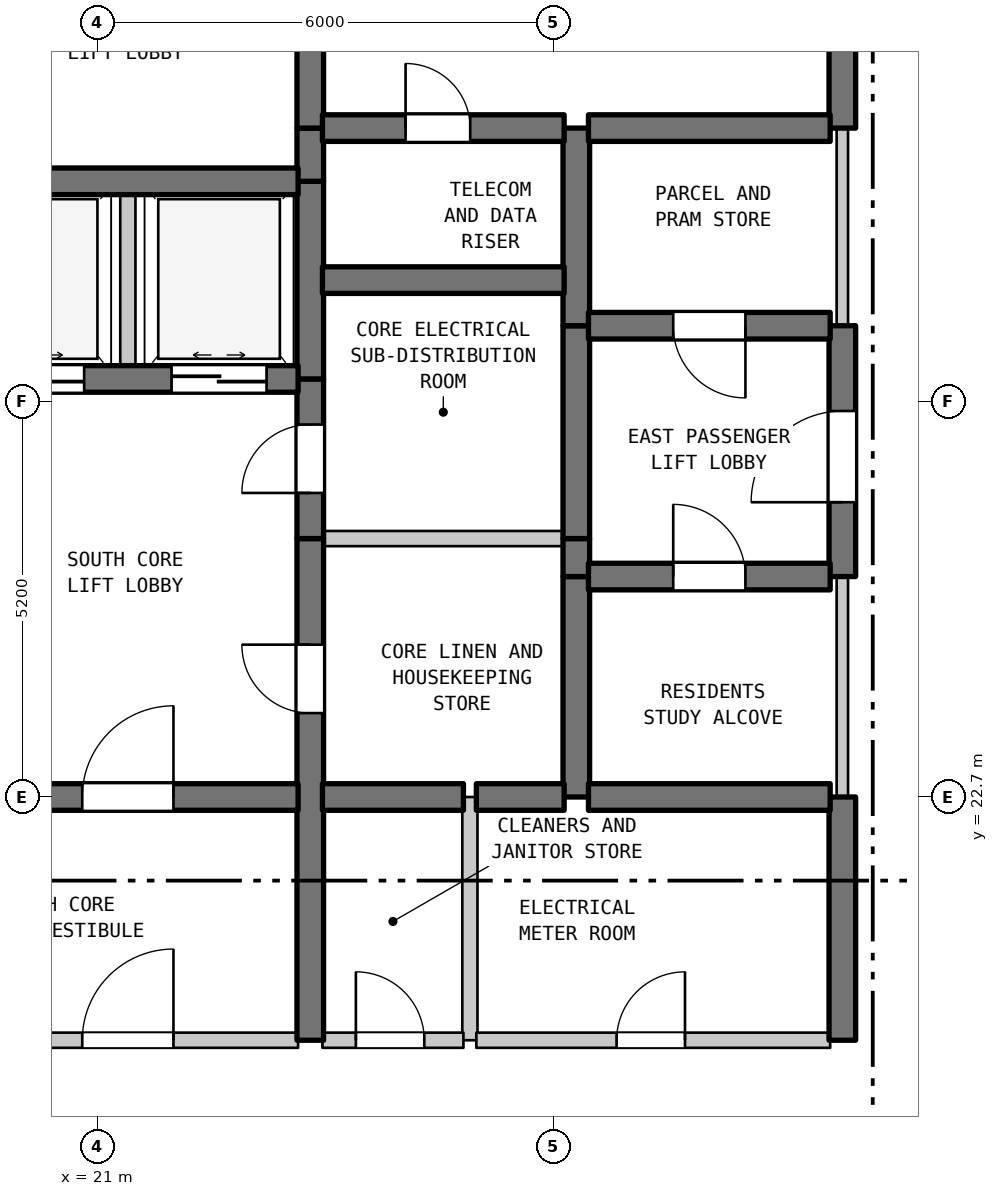
"""IFC4 building model, lengths in metres.
Left out: names, types, materials, properties, quantities, classifications, styles, units other than length and angle.
Written with IfcOpenShell. Run it as: python <this file> out.ifc"""

import sys

from ifc_helpers import new_model, si_unit, direction, frame, frame_2d, origin, place, context, subcontext, project, spatial, rectangle, extrude, element, fill, save


model = new_model("IFC4")
c1 = context("Model", 3, precision=1e-05, world=origin(), true_north=direction((0.0, 1.0)))
c2 = subcontext(c1, "Body", "Model", "MODEL_VIEW")
j1 = project(units=[si_unit("LENGTHUNIT", "METRE"), si_unit("PLANEANGLEUNIT", "RADIAN")], contexts=[c1])
p1 = place(None, origin())
s1 = spatial("IfcSite", under=j1, at=p1, CompositionType="ELEMENT")
p2 = place(p1, origin())
s2 = spatial("IfcBuilding", under=s1, at=p2, CompositionType="ELEMENT")
p3 = place(p2, frame((0.0, 0.0, 303.6)))
s3 = spatial("IfcBuildingStorey", under=s2, at=p3, CompositionType="ELEMENT", Elevation=303.6)
p4 = place(p3, frame((21.4, 28.2, 0.0), z_axis=(0.0, 0.0, 1.0), x_axis=(0.0, 1.0, 0.0)))
e1 = element("IfcWall", 1, at=p4, inside=s3, PredefinedType="STANDARD", context=c2, shape_type="SweptSolid", body=[
    extrude(rectangle(XDim=2.6, YDim=0.2, at=frame_2d((1.3, 0.0))), origin(), (0.0, 0.0, 1.0), 3.39),
])
p5 = place(p3, frame((23.8, 19.5, 0.0), z_axis=(0.0, 0.0, 1.0), x_axis=(0.0, 1.0, 0.0)))
e2 = element("IfcWall", 2, at=p5, inside=s3, PredefinedType="SHEAR", context=c2, shape_type="SweptSolid", body=[
    extrude(rectangle(XDim=6.6, YDim=0.35, at=frame_2d((3.3, 0.0))), origin(), (0.0, 0.0, 1.0), 3.39),
])
p6 = place(p5, frame((4.304, 0.0, 0.0)))
e3 = element("IfcOpeningElement", 3, at=p6, cuts=e2, PredefinedType="OPENING", context=c2, shape_type="SweptSolid", body=[
    extrude(rectangle(XDim=0.9, YDim=2.15, at=frame_2d((0.45, 1.075))), frame((0.0, 0.185, 0.0), z_axis=(0.0, -1.0, 0.0), x_axis=(1.0, 0.0, 0.0)), (0.0, 0.0, 1.0), 0.37),
])
p7 = place(p3, frame((23.8, 26.1, 0.0), z_axis=(0.0, 0.0, 1.0), x_axis=(0.0, 1.0, 0.0)))
e4 = element("IfcWall", 4, at=p7, inside=s3, PredefinedType="SHEAR", context=c2, shape_type="SweptSolid", body=[
    extrude(rectangle(XDim=2.1, YDim=0.35, at=frame_2d((1.05, 0.0))), origin(), (0.0, 0.0, 1.0), 3.39),
])
p8 = place(p7, frame((0.6, 0.0, 0.0)))
e5 = element("IfcOpeningElement", 5, at=p8, cuts=e4, PredefinedType="OPENING", context=c2, shape_type="SweptSolid", body=[
    extrude(rectangle(XDim=0.9, YDim=2.15, at=frame_2d((0.45, 1.075))), frame((0.0, 0.185, 0.0), z_axis=(0.0, -1.0, 0.0), x_axis=(1.0, 0.0, 0.0)), (0.0, 0.0, 1.0), 0.37),
])
p9 = place(p3, frame((23.8, 28.2, 0.0), z_axis=(0.0, 0.0, 1.0), x_axis=(0.0, 1.0, 0.0)))
e6 = element("IfcWall", 6, at=p9, inside=s3, PredefinedType="SHEAR", context=c2, shape_type="SweptSolid", body=[
    extrude(rectangle(XDim=2.6, YDim=0.35, at=frame_2d((1.3, 0.0))), origin(), (0.0, 0.0, 1.0), 3.39),
])
p10 = place(p3, frame((23.8, 30.8, 0.0), z_axis=(0.0, 0.0, 1.0), x_axis=(0.0, 1.0, 0.0)))
e7 = element("IfcWall", 7, at=p10, inside=s3, PredefinedType="SHEAR", context=c2, shape_type="SweptSolid", body=[
    extrude(rectangle(XDim=0.7, YDim=0.35, at=frame_2d((0.35, 0.0))), origin(), (0.0, 0.0, 1.0), 3.39),
])
p11 = place(p3, frame((23.8, 31.5, 0.0), z_axis=(0.0, 0.0, 1.0), x_axis=(0.0, 1.0, 0.0)))
e8 = element("IfcWall", 8, at=p11, inside=s3, PredefinedType="SHEAR", context=c2, shape_type="SweptSolid", body=[
    extrude(rectangle(XDim=3.5, YDim=0.35, at=frame_2d((1.75, 0.0))), origin(), (0.0, 0.0, 1.0), 3.39),
])
p12 = place(p11, frame((1.127, 0.0, 0.0)))
e9 = element("IfcOpeningElement", 9, at=p12, cuts=e8, PredefinedType="OPENING", context=c2, shape_type="SweptSolid", body=[
    extrude(rectangle(XDim=1.1, YDim=2.15, at=frame_2d((0.55, 1.075))), frame((0.0, 0.185, 0.0), z_axis=(0.0, -1.0, 0.0), x_axis=(1.0, 0.0, 0.0)), (0.0, 0.0, 1.0), 0.37),
])
p13 = place(p3, frame((25.9, 19.5, 0.0), z_axis=(0.0, 0.0, 1.0), x_axis=(0.0, 1.0, 0.0)))
e10 = element("IfcWall", 10, at=p13, inside=s3, PredefinedType="STANDARD", context=c2, shape_type="SweptSolid", body=[
    extrude(rectangle(XDim=3.2, YDim=0.2, at=frame_2d((1.6, 0.0))), origin(), (0.0, 0.0, 1.0), 3.39),
])
p14 = place(p3, frame((27.3, 22.7, 0.0), z_axis=(0.0, 0.0, 1.0), x_axis=(0.0, 1.0, 0.0)))
e11 = element("IfcWall", 11, at=p14, inside=s3, PredefinedType="SHEAR", context=c2, shape_type="SweptSolid", body=[
    extrude(rectangle(XDim=2.9, YDim=0.35, at=frame_2d((1.45, 0.0))), origin(), (0.0, 0.0, 1.0), 3.39),
])
p15 = place(p3, frame((27.3, 25.6, 0.0), z_axis=(0.0, 0.0, 1.0), x_axis=(0.0, 1.0, 0.0)))
e12 = element("IfcWall", 12, at=p15, inside=s3, PredefinedType="SHEAR", context=c2, shape_type="SweptSolid", body=[
    extrude(rectangle(XDim=0.5, YDim=0.35, at=frame_2d((0.25, 0.0))), origin(), (0.0, 0.0, 1.0), 3.39),
])
p16 = place(p3, frame((27.3, 26.1, 0.0), z_axis=(0.0, 0.0, 1.0), x_axis=(0.0, 1.0, 0.0)))
e13 = element("IfcWall", 13, at=p16, inside=s3, PredefinedType="SHEAR", context=c2, shape_type="SweptSolid", body=[
    extrude(rectangle(XDim=2.8, YDim=0.35, at=frame_2d((1.4, 0.0))), origin(), (0.0, 0.0, 1.0), 3.39),
])
p17 = place(p3, frame((27.3, 28.9, 0.0), z_axis=(0.0, 0.0, 1.0), x_axis=(0.0, 1.0, 0.0)))
e14 = element("IfcWall", 14, at=p17, inside=s3, PredefinedType="SHEAR", context=c2, shape_type="SweptSolid", body=[
    extrude(rectangle(XDim=2.6, YDim=0.35, at=frame_2d((1.3, 0.0))), origin(), (0.0, 0.0, 1.0), 3.39),
])
p18 = place(p3, frame((30.8, 19.5, 0.0), z_axis=(0.0, 0.0, 1.0), x_axis=(0.0, 1.0, 0.0)))
e15 = element("IfcWall", 15, at=p18, inside=s3, PredefinedType="SHEAR", context=c2, shape_type="SweptSolid", body=[
    extrude(rectangle(XDim=3.2, YDim=0.35, at=frame_2d((1.6, 0.0))), origin(), (0.0, 0.0, 1.0), 3.39),
])
p19 = place(p3, frame((30.8, 22.7, 0.0), z_axis=(0.0, 0.0, 1.0), x_axis=(0.0, 1.0, 0.0)))
e16 = element("IfcWall", 16, at=p19, inside=s3, PredefinedType="STANDARD", context=c2, shape_type="SweptSolid", body=[
    extrude(rectangle(XDim=2.9, YDim=0.15, at=frame_2d((1.45, 0.0))), origin(), (0.0, 0.0, 1.0), 3.39),
])
p20 = place(p3, frame((30.8, 25.6, 0.0), z_axis=(0.0, 0.0, 1.0), x_axis=(0.0, 1.0, 0.0)))
e17 = element("IfcWall", 17, at=p20, inside=s3, PredefinedType="SHEAR", context=c2, shape_type="SweptSolid", body=[
    extrude(rectangle(XDim=3.3, YDim=0.35, at=frame_2d((1.65, 0.0))), origin(), (0.0, 0.0, 1.0), 3.39),
])
p21 = place(p20, frame((0.978, 0.0, 0.0)))
e18 = element("IfcOpeningElement", 18, at=p21, cuts=e17, PredefinedType="OPENING", context=c2, shape_type="SweptSolid", body=[
    extrude(rectangle(XDim=1.2, YDim=2.2, at=frame_2d((0.6, 1.1))), frame((0.0, 0.185, 0.0), z_axis=(0.0, -1.0, 0.0), x_axis=(1.0, 0.0, 0.0)), (0.0, 0.0, 1.0), 0.37),
])
p22 = place(p3, frame((30.8, 28.9, 0.0), z_axis=(0.0, 0.0, 1.0), x_axis=(0.0, 1.0, 0.0)))
e19 = element("IfcWall", 19, at=p22, inside=s3, PredefinedType="STANDARD", context=c2, shape_type="SweptSolid", body=[
    extrude(rectangle(XDim=2.6, YDim=0.15, at=frame_2d((1.3, 0.0))), origin(), (0.0, 0.0, 1.0), 3.39),
])
p23 = place(p3, frame((30.8, 31.5, 0.0), z_axis=(0.0, 0.0, 1.0), x_axis=(0.0, 1.0, 0.0)))
e20 = element("IfcWall", 20, at=p23, inside=s3, PredefinedType="SHEAR", context=c2, shape_type="SweptSolid", body=[
    extrude(rectangle(XDim=3.5, YDim=0.35, at=frame_2d((1.75, 0.0))), origin(), (0.0, 0.0, 1.0), 3.39),
])
p24 = place(p23, frame((1.15, 0.0, 0.0)))
e21 = element("IfcOpeningElement", 21, at=p24, cuts=e20, PredefinedType="OPENING", context=c2, shape_type="SweptSolid", body=[
    extrude(rectangle(XDim=1.2, YDim=2.2, at=frame_2d((0.6, 1.1))), frame((0.0, 0.185, 0.0), z_axis=(0.0, -1.0, 0.0), x_axis=(1.0, 0.0, 0.0)), (0.0, 0.0, 1.0), 0.37),
])
p25 = place(p3, frame((19.16, 19.5, 0.0), z_axis=(0.0, 0.0, 1.0), x_axis=(1.0, 0.0, 0.0)))
e22 = element("IfcWall", 22, at=p25, inside=s3, PredefinedType="STANDARD", context=c2, shape_type="SweptSolid", body=[
    extrude(rectangle(XDim=4.48, YDim=0.2, at=frame_2d((2.24, 0.0))), origin(), (0.0, 0.0, 1.0), 3.39),
])
p26 = place(p25, frame((1.64, 0.0, 0.0)))
e23 = element("IfcOpeningElement", 23, at=p26, cuts=e22, PredefinedType="OPENING", context=c2, shape_type="SweptSolid", body=[
    extrude(rectangle(XDim=1.2, YDim=2.2, at=frame_2d((0.6, 1.1))), frame((0.0, 0.11, 0.0), z_axis=(0.0, -1.0, 0.0), x_axis=(1.0, 0.0, 0.0)), (0.0, 0.0, 1.0), 0.22),
])
p27 = place(p3, frame((23.96, 19.5, 0.0), z_axis=(0.0, 0.0, 1.0), x_axis=(1.0, 0.0, 0.0)))
e24 = element("IfcWall", 24, at=p27, inside=s3, PredefinedType="STANDARD", context=c2, shape_type="SweptSolid", body=[
    extrude(rectangle(XDim=1.855, YDim=0.2, at=frame_2d((0.927, 0.0))), origin(), (0.0, 0.0, 1.0), 3.39),
])
p28 = place(p27, frame((0.44, 0.0, 0.0)))
e25 = element("IfcOpeningElement", 25, at=p28, cuts=e24, PredefinedType="OPENING", context=c2, shape_type="SweptSolid", body=[
    extrude(rectangle(XDim=0.9, YDim=2.15, at=frame_2d((0.45, 1.075))), frame((0.0, 0.11, 0.0), z_axis=(0.0, -1.0, 0.0), x_axis=(1.0, 0.0, 0.0)), (0.0, 0.0, 1.0), 0.22),
])
p29 = place(p3, frame((25.985, 19.5, 0.0), z_axis=(0.0, 0.0, 1.0), x_axis=(1.0, 0.0, 0.0)))
e26 = element("IfcWall", 26, at=p29, inside=s3, PredefinedType="STANDARD", context=c2, shape_type="SweptSolid", body=[
    extrude(rectangle(XDim=4.655, YDim=0.2, at=frame_2d((2.327, 0.0))), origin(), (0.0, 0.0, 1.0), 3.39),
])
p30 = place(p29, frame((1.845, 0.0, 0.0)))
e27 = element("IfcOpeningElement", 27, at=p30, cuts=e26, PredefinedType="OPENING", context=c2, shape_type="SweptSolid", body=[
    extrude(rectangle(XDim=0.9, YDim=2.15, at=frame_2d((0.45, 1.075))), frame((0.0, 0.11, 0.0), z_axis=(0.0, -1.0, 0.0), x_axis=(1.0, 0.0, 0.0)), (0.0, 0.0, 1.0), 0.22),
])
p31 = place(p3, frame((19.16, 22.7, 0.0), z_axis=(0.0, 0.0, 1.0), x_axis=(1.0, 0.0, 0.0)))
e28 = element("IfcWall", 28, at=p31, inside=s3, PredefinedType="SHEAR", context=c2, shape_type="SweptSolid", body=[
    extrude(rectangle(XDim=4.48, YDim=0.35, at=frame_2d((2.24, 0.0))), origin(), (0.0, 0.0, 1.0), 3.39),
])
p32 = place(p31, frame((1.64, 0.0, 0.0)))
e29 = element("IfcOpeningElement", 29, at=p32, cuts=e28, PredefinedType="OPENING", context=c2, shape_type="SweptSolid", body=[
    extrude(rectangle(XDim=1.2, YDim=2.2, at=frame_2d((0.6, 1.1))), frame((0.0, 0.185, 0.0), z_axis=(0.0, -1.0, 0.0), x_axis=(1.0, 0.0, 0.0)), (0.0, 0.0, 1.0), 0.37),
])
p33 = place(p3, frame((23.96, 22.7, 0.0), z_axis=(0.0, 0.0, 1.0), x_axis=(1.0, 0.0, 0.0)))
e30 = element("IfcWall", 30, at=p33, inside=s3, PredefinedType="SHEAR", context=c2, shape_type="SweptSolid", body=[
    extrude(rectangle(XDim=1.855, YDim=0.35, at=frame_2d((0.927, 0.0))), origin(), (0.0, 0.0, 1.0), 3.39),
])
p34 = place(p3, frame((25.985, 22.7, 0.0), z_axis=(0.0, 0.0, 1.0), x_axis=(1.0, 0.0, 0.0)))
e31 = element("IfcWall", 31, at=p34, inside=s3, PredefinedType="SHEAR", context=c2, shape_type="SweptSolid", body=[
    extrude(rectangle(XDim=1.155, YDim=0.35, at=frame_2d((0.577, 0.0))), origin(), (0.0, 0.0, 1.0), 3.39),
])
p35 = place(p3, frame((27.46, 22.7, 0.0), z_axis=(0.0, 0.0, 1.0), x_axis=(1.0, 0.0, 0.0)))
e32 = element("IfcWall", 32, at=p35, inside=s3, PredefinedType="SHEAR", context=c2, shape_type="SweptSolid", body=[
    extrude(rectangle(XDim=3.18, YDim=0.35, at=frame_2d((1.59, 0.0))), origin(), (0.0, 0.0, 1.0), 3.39),
])
p36 = place(p3, frame((27.46, 25.6, 0.0), z_axis=(0.0, 0.0, 1.0), x_axis=(1.0, 0.0, 0.0)))
e33 = element("IfcWall", 33, at=p36, inside=s3, PredefinedType="SHEAR", context=c2, shape_type="SweptSolid", body=[
    extrude(rectangle(XDim=3.18, YDim=0.35, at=frame_2d((1.59, 0.0))), origin(), (0.0, 0.0, 1.0), 3.39),
])
p37 = place(p36, frame((1.115, 0.0, 0.0)))
e34 = element("IfcOpeningElement", 34, at=p37, cuts=e33, PredefinedType="OPENING", context=c2, shape_type="SweptSolid", body=[
    extrude(rectangle(XDim=0.95, YDim=2.15, at=frame_2d((0.475, 1.075))), frame((0.0, 0.185, 0.0), z_axis=(0.0, -1.0, 0.0), x_axis=(1.0, 0.0, 0.0)), (0.0, 0.0, 1.0), 0.37),
])
p38 = place(p3, frame((23.96, 26.1, 0.0), z_axis=(0.0, 0.0, 1.0), x_axis=(1.0, 0.0, 0.0)))
e35 = element("IfcWall", 35, at=p38, inside=s3, PredefinedType="STANDARD", context=c2, shape_type="SweptSolid", body=[
    extrude(rectangle(XDim=3.18, YDim=0.2, at=frame_2d((1.59, 0.0))), origin(), (0.0, 0.0, 1.0), 3.39),
])
p39 = place(p3, frame((19.16, 28.2, 0.0), z_axis=(0.0, 0.0, 1.0), x_axis=(1.0, 0.0, 0.0)))
e36 = element("IfcWall", 36, at=p39, inside=s3, PredefinedType="SHEAR", context=c2, shape_type="SweptSolid", body=[
    extrude(rectangle(XDim=4.48, YDim=0.35, at=frame_2d((2.24, 0.0))), origin(), (0.0, 0.0, 1.0), 3.39),
])
p40 = place(p39, frame((0.415, 0.0, 0.0)))
e37 = element("IfcOpeningElement", 37, at=p40, cuts=e36, PredefinedType="OPENING", context=c2, shape_type="SweptSolid", body=[
    extrude(rectangle(XDim=1.25, YDim=2.2, at=frame_2d((0.625, 1.1))), frame((0.0, 0.185, 0.0), z_axis=(0.0, -1.0, 0.0), x_axis=(1.0, 0.0, 0.0)), (0.0, 0.0, 1.0), 0.37),
])
p41 = place(p39, frame((2.815, 0.0, 0.0)))
e38 = element("IfcOpeningElement", 38, at=p41, cuts=e36, PredefinedType="OPENING", context=c2, shape_type="SweptSolid", body=[
    extrude(rectangle(XDim=1.25, YDim=2.2, at=frame_2d((0.625, 1.1))), frame((0.0, 0.185, 0.0), z_axis=(0.0, -1.0, 0.0), x_axis=(1.0, 0.0, 0.0)), (0.0, 0.0, 1.0), 0.37),
])
p42 = place(p3, frame((27.46, 28.9, 0.0), z_axis=(0.0, 0.0, 1.0), x_axis=(1.0, 0.0, 0.0)))
e39 = element("IfcWall", 39, at=p42, inside=s3, PredefinedType="SHEAR", context=c2, shape_type="SweptSolid", body=[
    extrude(rectangle(XDim=3.18, YDim=0.35, at=frame_2d((1.59, 0.0))), origin(), (0.0, 0.0, 1.0), 3.39),
])
p43 = place(p42, frame((1.115, 0.0, 0.0)))
e40 = element("IfcOpeningElement", 40, at=p43, cuts=e39, PredefinedType="OPENING", context=c2, shape_type="SweptSolid", body=[
    extrude(rectangle(XDim=0.95, YDim=2.15, at=frame_2d((0.475, 1.075))), frame((0.0, 0.185, 0.0), z_axis=(0.0, -1.0, 0.0), x_axis=(1.0, 0.0, 0.0)), (0.0, 0.0, 1.0), 0.37),
])
p44 = place(p3, frame((23.96, 29.5, 0.0), z_axis=(0.0, 0.0, 1.0), x_axis=(1.0, 0.0, 0.0)))
e41 = element("IfcWall", 41, at=p44, inside=s3, PredefinedType="SHEAR", context=c2, shape_type="SweptSolid", body=[
    extrude(rectangle(XDim=3.18, YDim=0.35, at=frame_2d((1.59, 0.0))), origin(), (0.0, 0.0, 1.0), 3.39),
])
p45 = place(p3, frame((19.16, 30.8, 0.0), z_axis=(0.0, 0.0, 1.0), x_axis=(1.0, 0.0, 0.0)))
e42 = element("IfcWall", 42, at=p45, inside=s3, PredefinedType="SHEAR", context=c2, shape_type="SweptSolid", body=[
    extrude(rectangle(XDim=4.48, YDim=0.35, at=frame_2d((2.24, 0.0))), origin(), (0.0, 0.0, 1.0), 3.39),
])
p46 = place(p3, frame((23.96, 31.5, 0.0), z_axis=(0.0, 0.0, 1.0), x_axis=(1.0, 0.0, 0.0)))
e43 = element("IfcWall", 43, at=p46, inside=s3, PredefinedType="SHEAR", context=c2, shape_type="SweptSolid", body=[
    extrude(rectangle(XDim=3.18, YDim=0.35, at=frame_2d((1.59, 0.0))), origin(), (0.0, 0.0, 1.0), 3.39),
])
p47 = place(p46, frame((1.094, 0.0, 0.0)))
e44 = element("IfcOpeningElement", 44, at=p47, cuts=e43, PredefinedType="OPENING", context=c2, shape_type="SweptSolid", body=[
    extrude(rectangle(XDim=0.85, YDim=2.1, at=frame_2d((0.425, 1.05))), frame((0.0, 0.185, 0.0), z_axis=(0.0, -1.0, 0.0), x_axis=(1.0, 0.0, 0.0)), (0.0, 0.0, 1.0), 0.37),
])
p48 = place(p3, frame((27.46, 31.5, 0.0), z_axis=(0.0, 0.0, 1.0), x_axis=(1.0, 0.0, 0.0)))
e45 = element("IfcWall", 45, at=p48, inside=s3, PredefinedType="SHEAR", context=c2, shape_type="SweptSolid", body=[
    extrude(rectangle(XDim=3.18, YDim=0.35, at=frame_2d((1.59, 0.0))), origin(), (0.0, 0.0, 1.0), 3.39),
])
p49 = place(p6, origin())
e46 = element("IfcDoor", 46, at=p49, inside=s3, OperationType="SINGLE_SWING_RIGHT", PredefinedType="DOOR", context=c2, shape_type="SweptSolid", body=[
    extrude(rectangle(XDim=0.9, YDim=2.15, at=frame_2d((0.45, 1.075))), frame((0.0, 0.025, 0.0), z_axis=(0.0, -1.0, 0.0), x_axis=(1.0, 0.0, 0.0)), (0.0, 0.0, 1.0), 0.05),
])
fill(e3, e46)
p50 = place(p8, origin())
e47 = element("IfcDoor", 47, at=p50, inside=s3, OperationType="SINGLE_SWING_LEFT", PredefinedType="DOOR", context=c2, shape_type="SweptSolid", body=[
    extrude(rectangle(XDim=0.9, YDim=2.15, at=frame_2d((0.45, 1.075))), frame((0.0, 0.025, 0.0), z_axis=(0.0, -1.0, 0.0), x_axis=(1.0, 0.0, 0.0)), (0.0, 0.0, 1.0), 0.05),
])
fill(e5, e47)
p51 = place(p21, origin())
e48 = element("IfcDoor", 48, at=p51, inside=s3, OperationType="SINGLE_SWING_LEFT", PredefinedType="DOOR", context=c2, shape_type="SweptSolid", body=[
    extrude(rectangle(XDim=1.2, YDim=2.2, at=frame_2d((0.6, 1.1))), frame((0.0, 0.025, 0.0), z_axis=(0.0, -1.0, 0.0), x_axis=(1.0, 0.0, 0.0)), (0.0, 0.0, 1.0), 0.05),
])
fill(e18, e48)
p52 = place(p26, origin())
e49 = element("IfcDoor", 49, at=p52, inside=s3, OperationType="SINGLE_SWING_RIGHT", PredefinedType="DOOR", context=c2, shape_type="SweptSolid", body=[
    extrude(rectangle(XDim=1.2, YDim=2.2, at=frame_2d((0.6, 1.1))), frame((0.0, 0.025, 0.0), z_axis=(0.0, -1.0, 0.0), x_axis=(1.0, 0.0, 0.0)), (0.0, 0.0, 1.0), 0.05),
])
fill(e23, e49)
p53 = place(p28, origin())
e50 = element("IfcDoor", 50, at=p53, inside=s3, OperationType="SINGLE_SWING_LEFT", PredefinedType="DOOR", context=c2, shape_type="SweptSolid", body=[
    extrude(rectangle(XDim=0.9, YDim=2.15, at=frame_2d((0.45, 1.075))), frame((0.0, 0.025, 0.0), z_axis=(0.0, -1.0, 0.0), x_axis=(1.0, 0.0, 0.0)), (0.0, 0.0, 1.0), 0.05),
])
fill(e25, e50)
p54 = place(p30, origin())
e51 = element("IfcDoor", 51, at=p54, inside=s3, OperationType="SINGLE_SWING_RIGHT", PredefinedType="DOOR", context=c2, shape_type="SweptSolid", body=[
    extrude(rectangle(XDim=0.9, YDim=2.15, at=frame_2d((0.45, 1.075))), frame((0.0, 0.025, 0.0), z_axis=(0.0, -1.0, 0.0), x_axis=(1.0, 0.0, 0.0)), (0.0, 0.0, 1.0), 0.05),
])
fill(e27, e51)
p55 = place(p32, origin())
e52 = element("IfcDoor", 52, at=p55, inside=s3, OperationType="SINGLE_SWING_RIGHT", PredefinedType="DOOR", context=c2, shape_type="SweptSolid", body=[
    extrude(rectangle(XDim=1.2, YDim=2.2, at=frame_2d((0.6, 1.1))), frame((0.0, 0.025, 0.0), z_axis=(0.0, -1.0, 0.0), x_axis=(1.0, 0.0, 0.0)), (0.0, 0.0, 1.0), 0.05),
])
fill(e29, e52)
p56 = place(p37, origin())
e53 = element("IfcDoor", 53, at=p56, inside=s3, OperationType="SINGLE_SWING_LEFT", PredefinedType="DOOR", context=c2, shape_type="SweptSolid", body=[
    extrude(rectangle(XDim=0.95, YDim=2.15, at=frame_2d((0.475, 1.075))), frame((0.0, 0.025, 0.0), z_axis=(0.0, -1.0, 0.0), x_axis=(1.0, 0.0, 0.0)), (0.0, 0.0, 1.0), 0.05),
])
fill(e34, e53)
p57 = place(p40, origin())
e54 = element("IfcDoor", 54, at=p57, inside=s3, OperationType="DOUBLE_DOOR_SLIDING", PredefinedType="DOOR", context=c2, shape_type="SweptSolid", body=[
    extrude(rectangle(XDim=1.25, YDim=2.2, at=frame_2d((0.625, 1.1))), frame((0.0, 0.025, 0.0), z_axis=(0.0, -1.0, 0.0), x_axis=(1.0, 0.0, 0.0)), (0.0, 0.0, 1.0), 0.05),
])
fill(e37, e54)
p58 = place(p41, origin())
e55 = element("IfcDoor", 55, at=p58, inside=s3, OperationType="DOUBLE_DOOR_SLIDING", PredefinedType="DOOR", context=c2, shape_type="SweptSolid", body=[
    extrude(rectangle(XDim=1.25, YDim=2.2, at=frame_2d((0.625, 1.1))), frame((0.0, 0.025, 0.0), z_axis=(0.0, -1.0, 0.0), x_axis=(1.0, 0.0, 0.0)), (0.0, 0.0, 1.0), 0.05),
])
fill(e38, e55)
p59 = place(p43, frame((0.95, 0.0, 0.0), z_axis=(0.0, 0.0, 1.0), x_axis=(-1.0, 0.0, 0.0)))
e56 = element("IfcDoor", 56, at=p59, inside=s3, OperationType="SINGLE_SWING_RIGHT", PredefinedType="DOOR", context=c2, shape_type="SweptSolid", body=[
    extrude(rectangle(XDim=0.95, YDim=2.15, at=frame_2d((0.475, 1.075))), frame((0.0, 0.025, 0.0), z_axis=(0.0, -1.0, 0.0), x_axis=(1.0, 0.0, 0.0)), (0.0, 0.0, 1.0), 0.05),
])
fill(e40, e56)
p60 = place(p47, origin())
e57 = element("IfcDoor", 57, at=p60, inside=s3, OperationType="SINGLE_SWING_LEFT", PredefinedType="DOOR", context=c2, shape_type="SweptSolid", body=[
    extrude(rectangle(XDim=0.85, YDim=2.1, at=frame_2d((0.425, 1.05))), frame((0.0, 0.025, 0.0), z_axis=(0.0, -1.0, 0.0), x_axis=(1.0, 0.0, 0.0)), (0.0, 0.0, 1.0), 0.05),
])
fill(e44, e57)
save(model, sys.argv[1])
